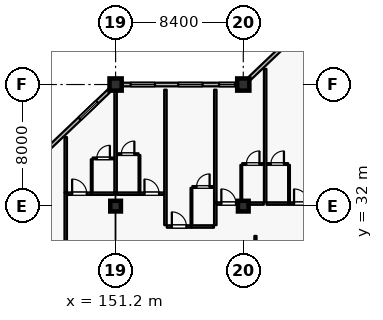
"""IFC4 building model, lengths in metres.
Left out: names, types, materials, properties, quantities, classifications, styles, units other than length and angle.
Written with IfcOpenShell. Run it as: python <this file> out.ifc"""

import sys

from ifc_helpers import new_model, si_unit, direction, frame, frame_2d, origin, origin_2d, place, context, subcontext, project, spatial, rectangle, extrude, element, fill, save


model = new_model("IFC4")
c1 = context("Model", 3, precision=1e-05, world=origin(), true_north=direction((0.0, 1.0)))
c2 = subcontext(c1, "Body", "Model", "MODEL_VIEW")
j1 = project(units=[si_unit("LENGTHUNIT", "METRE"), si_unit("PLANEANGLEUNIT", "RADIAN")], contexts=[c1])
p1 = place(None, origin())
s1 = spatial("IfcSite", under=j1, at=p1, CompositionType="ELEMENT")
p2 = place(p1, origin())
s2 = spatial("IfcBuilding", under=s1, at=p2, CompositionType="ELEMENT")
p3 = place(p2, frame((0.0, 0.0, 16.2)))
s3 = spatial("IfcBuildingStorey", under=s2, at=p3, CompositionType="ELEMENT", Elevation=16.2)
for number, where, z_axis, x_axis in (
    (1, (151.2, 40.0, 0.0), (0.0, 0.0, 1.0), (1.0, 0.0, 0.0)),
    (2, (159.6, 40.0, 0.0), (0.0, 0.0, 1.0), (1.0, 0.0, 0.0)),
):
    element("IfcColumn", number, at=place(p3, frame(where, z_axis=z_axis, x_axis=x_axis)), inside=s3, PredefinedType="COLUMN", context=c2, shape_type="SweptSolid", body=[
        extrude(rectangle(XDim=0.8, YDim=0.8, at=origin_2d()), origin(), (0.0, 0.0, 1.0), 4.8),
    ])
for number, where, z_axis, x_axis in (
    (3, (151.2, 32.0, 0.0), (0.0, 0.0, 1.0), (1.0, 0.0, 0.0)),
    (4, (159.6, 32.0, 0.0), (0.0, 0.0, 1.0), (1.0, 0.0, 0.0)),
):
    element("IfcColumn", number, at=place(p3, frame(where, z_axis=z_axis, x_axis=x_axis)), inside=s3, PredefinedType="COLUMN", context=c2, shape_type="SweptSolid", body=[
        extrude(rectangle(XDim=0.7, YDim=0.7, at=origin_2d()), origin(), (0.0, 0.0, 1.0), 4.8),
    ])
p4 = place(p3, frame((143.2, 32.381, 0.0), z_axis=(0.0, 0.0, 1.0), x_axis=(0.724156739794, 0.689635422677, 0.0)))
e5 = element("IfcWall", 5, at=p4, inside=s3, PredefinedType="SOLIDWALL", context=c2, shape_type="SweptSolid", body=[
    extrude(rectangle(XDim=10.495, YDim=0.24, at=frame_2d((5.248, 0.0))), origin(), (0.0, 0.0, 1.0), 4.13),
])
p5 = place(p4, frame((0.125, 0.0, 0.8)))
e6 = element("IfcOpeningElement", 6, at=p5, cuts=e5, PredefinedType="OPENING", context=c2, shape_type="SweptSolid", body=[
    extrude(rectangle(XDim=1.6, YDim=1.6, at=frame_2d((0.8, 0.8))), frame((0.0, 0.13, 0.0), z_axis=(0.0, -1.0, 0.0), x_axis=(1.0, 0.0, 0.0)), (0.0, 0.0, 1.0), 0.26),
])
p6 = place(p4, frame((3.453, 0.0, 0.8)))
e7 = element("IfcOpeningElement", 7, at=p6, cuts=e5, PredefinedType="OPENING", context=c2, shape_type="SweptSolid", body=[
    extrude(rectangle(XDim=1.6, YDim=1.6, at=frame_2d((0.8, 0.8))), frame((0.0, 0.13, 0.0), z_axis=(0.0, -1.0, 0.0), x_axis=(1.0, 0.0, 0.0)), (0.0, 0.0, 1.0), 0.26),
])
p7 = place(p4, frame((7.776, 0.0, 0.8)))
e8 = element("IfcOpeningElement", 8, at=p7, cuts=e5, PredefinedType="OPENING", context=c2, shape_type="SweptSolid", body=[
    extrude(rectangle(XDim=1.6, YDim=1.6, at=frame_2d((0.8, 0.8))), frame((0.0, 0.13, 0.0), z_axis=(0.0, -1.0, 0.0), x_axis=(1.0, 0.0, 0.0)), (0.0, 0.0, 1.0), 0.26),
])
p8 = place(p3, frame((151.6, 40.0, 0.0), z_axis=(0.0, 0.0, 1.0), x_axis=(1.0, 0.0, 0.0)))
e9 = element("IfcWall", 9, at=p8, inside=s3, PredefinedType="SOLIDWALL", context=c2, shape_type="SweptSolid", body=[
    extrude(rectangle(XDim=7.6, YDim=0.24, at=frame_2d((3.8, 0.0))), origin(), (0.0, 0.0, 1.0), 4.13),
])
p9 = place(p8, frame((0.59, 0.0, 0.8)))
e10 = element("IfcOpeningElement", 10, at=p9, cuts=e9, PredefinedType="OPENING", context=c2, shape_type="SweptSolid", body=[
    extrude(rectangle(XDim=1.6, YDim=1.6, at=frame_2d((0.8, 0.8))), frame((0.0, 0.13, 0.0), z_axis=(0.0, -1.0, 0.0), x_axis=(1.0, 0.0, 0.0)), (0.0, 0.0, 1.0), 0.26),
])
p10 = place(p8, frame((3.72, 0.0, 0.8)))
e11 = element("IfcOpeningElement", 11, at=p10, cuts=e9, PredefinedType="OPENING", context=c2, shape_type="SweptSolid", body=[
    extrude(rectangle(XDim=1.6, YDim=1.6, at=frame_2d((0.8, 0.8))), frame((0.0, 0.13, 0.0), z_axis=(0.0, -1.0, 0.0), x_axis=(1.0, 0.0, 0.0)), (0.0, 0.0, 1.0), 0.26),
])
p11 = place(p8, frame((6.405, 0.0, 0.8)))
e12 = element("IfcOpeningElement", 12, at=p11, cuts=e9, PredefinedType="OPENING", context=c2, shape_type="SweptSolid", body=[
    extrude(rectangle(XDim=1.05, YDim=1.65, at=frame_2d((0.525, 0.825))), frame((0.0, 0.13, 0.0), z_axis=(0.0, -1.0, 0.0), x_axis=(1.0, 0.0, 0.0)), (0.0, 0.0, 1.0), 0.26),
])
p12 = place(p3, frame((160.0, 40.381, 0.0), z_axis=(0.0, 0.0, 1.0), x_axis=(0.724156739794, 0.689635422677, 0.0)))
e13 = element("IfcWall", 13, at=p12, inside=s3, PredefinedType="SOLIDWALL", context=c2, shape_type="SweptSolid", body=[
    extrude(rectangle(XDim=10.495, YDim=0.24, at=frame_2d((5.248, 0.0))), origin(), (0.0, 0.0, 1.0), 4.13),
])
p13 = place(p12, frame((2.901, 0.0, 0.8)))
e14 = element("IfcOpeningElement", 14, at=p13, cuts=e13, PredefinedType="OPENING", context=c2, shape_type="SweptSolid", body=[
    extrude(rectangle(XDim=1.6, YDim=1.6, at=frame_2d((0.8, 0.8))), frame((0.0, 0.13, 0.0), z_axis=(0.0, -1.0, 0.0), x_axis=(1.0, 0.0, 0.0)), (0.0, 0.0, 1.0), 0.26),
])
p14 = place(p12, frame((7.43, 0.0, 0.8)))
e15 = element("IfcOpeningElement", 15, at=p14, cuts=e13, PredefinedType="OPENING", context=c2, shape_type="SweptSolid", body=[
    extrude(rectangle(XDim=1.6, YDim=1.6, at=frame_2d((0.8, 0.8))), frame((0.0, 0.13, 0.0), z_axis=(0.0, -1.0, 0.0), x_axis=(1.0, 0.0, 0.0)), (0.0, 0.0, 1.0), 0.26),
])
p15 = place(p3, frame((147.92, 28.46, 0.0), z_axis=(0.0, 0.0, 1.0), x_axis=(0.0, 1.0, 0.0)))
e16 = element("IfcWall", 16, at=p15, inside=s3, PredefinedType="PARTITIONING", context=c2, shape_type="SweptSolid", body=[
    extrude(rectangle(XDim=4.44, YDim=0.16, at=frame_2d((2.22, 0.0))), origin(), (0.0, 0.0, 1.0), 4.535),
])
p16 = place(p3, frame((148.01, 32.82, 0.0), z_axis=(0.0, 0.0, 1.0), x_axis=(1.0, 0.0, 0.0)))
e17 = element("IfcWall", 17, at=p16, inside=s3, PredefinedType="PARTITIONING", context=c2, shape_type="SweptSolid", body=[
    extrude(rectangle(XDim=1.62, YDim=0.16, at=frame_2d((0.81, 0.0))), origin(), (0.0, 0.0, 1.0), 4.535),
])
p17 = place(p16, frame((0.33, 0.0, 0.0)))
e18 = element("IfcOpeningElement", 18, at=p17, cuts=e17, PredefinedType="OPENING", context=c2, shape_type="SweptSolid", body=[
    extrude(rectangle(XDim=0.96, YDim=2.2, at=frame_2d((0.48, 1.1))), frame((0.0, 0.09, 0.0), z_axis=(0.0, -1.0, 0.0), x_axis=(1.0, 0.0, 0.0)), (0.0, 0.0, 1.0), 0.18),
])
p18 = place(p3, frame((149.64, 32.82, 0.0), z_axis=(0.0, 0.0, 1.0), x_axis=(1.0, 0.0, 0.0)))
e19 = element("IfcWall", 19, at=p18, inside=s3, PredefinedType="PARTITIONING", context=c2, shape_type="SweptSolid", body=[
    extrude(rectangle(XDim=1.47, YDim=0.16, at=frame_2d((0.735, 0.0))), origin(), (0.0, 0.0, 1.0), 4.535),
])
p19 = place(p3, frame((149.63, 32.91, 0.0), z_axis=(0.0, 0.0, 1.0), x_axis=(0.0, 1.0, 0.0)))
e20 = element("IfcWall", 20, at=p19, inside=s3, PredefinedType="PARTITIONING", context=c2, shape_type="SweptSolid", body=[
    extrude(rectangle(XDim=2.17, YDim=0.115, at=frame_2d((1.085, 0.0))), origin(), (0.0, 0.0, 1.0), 4.535),
])
p20 = place(p3, frame((149.69, 35.14, 0.0), z_axis=(0.0, 0.0, 1.0), x_axis=(1.0, 0.0, 0.0)))
e21 = element("IfcWall", 21, at=p20, inside=s3, PredefinedType="PARTITIONING", context=c2, shape_type="SweptSolid", body=[
    extrude(rectangle(XDim=1.41, YDim=0.115, at=frame_2d((0.705, 0.0))), origin(), (0.0, 0.0, 1.0), 4.535),
])
p21 = place(p20, frame((0.275, 0.0, 0.0)))
e22 = element("IfcOpeningElement", 22, at=p21, cuts=e21, PredefinedType="OPENING", context=c2, shape_type="SweptSolid", body=[
    extrude(rectangle(XDim=0.86, YDim=2.12, at=frame_2d((0.43, 1.06))), frame((0.0, 0.067, 0.0), z_axis=(0.0, -1.0, 0.0), x_axis=(1.0, 0.0, 0.0)), (0.0, 0.0, 1.0), 0.135),
])
p22 = place(p3, frame((147.92, 32.91, 0.0), z_axis=(0.0, 0.0, 1.0), x_axis=(0.0, 1.0, 0.0)))
e23 = element("IfcWall", 23, at=p22, inside=s3, PredefinedType="PARTITIONING", context=c2, shape_type="SweptSolid", body=[
    extrude(rectangle(XDim=3.63, YDim=0.16, at=frame_2d((1.815, 0.0))), origin(), (0.0, 0.0, 1.0), 4.535),
])
p23 = place(p3, frame((151.29, 32.82, 0.0), z_axis=(0.0, 0.0, 1.0), x_axis=(1.0, 0.0, 0.0)))
e24 = element("IfcWall", 24, at=p23, inside=s3, PredefinedType="PARTITIONING", context=c2, shape_type="SweptSolid", body=[
    extrude(rectangle(XDim=1.47, YDim=0.16, at=frame_2d((0.735, 0.0))), origin(), (0.0, 0.0, 1.0), 4.535),
])
p24 = place(p3, frame((152.77, 32.82, 0.0), z_axis=(0.0, 0.0, 1.0), x_axis=(1.0, 0.0, 0.0)))
e25 = element("IfcWall", 25, at=p24, inside=s3, PredefinedType="PARTITIONING", context=c2, shape_type="SweptSolid", body=[
    extrude(rectangle(XDim=1.62, YDim=0.16, at=frame_2d((0.81, 0.0))), origin(), (0.0, 0.0, 1.0), 4.535),
])
p25 = place(p24, frame((0.33, 0.0, 0.0)))
e26 = element("IfcOpeningElement", 26, at=p25, cuts=e25, PredefinedType="OPENING", context=c2, shape_type="SweptSolid", body=[
    extrude(rectangle(XDim=0.96, YDim=2.2, at=frame_2d((0.48, 1.1))), frame((0.0, 0.09, 0.0), z_axis=(0.0, -1.0, 0.0), x_axis=(1.0, 0.0, 0.0)), (0.0, 0.0, 1.0), 0.18),
])
p26 = place(p3, frame((152.77, 32.91, 0.0), z_axis=(0.0, 0.0, 1.0), x_axis=(0.0, 1.0, 0.0)))
e27 = element("IfcWall", 27, at=p26, inside=s3, PredefinedType="PARTITIONING", context=c2, shape_type="SweptSolid", body=[
    extrude(rectangle(XDim=2.45, YDim=0.115, at=frame_2d((1.225, 0.0))), origin(), (0.0, 0.0, 1.0), 4.535),
])
p27 = place(p3, frame((151.3, 35.42, 0.0), z_axis=(0.0, 0.0, 1.0), x_axis=(1.0, 0.0, 0.0)))
e28 = element("IfcWall", 28, at=p27, inside=s3, PredefinedType="PARTITIONING", context=c2, shape_type="SweptSolid", body=[
    extrude(rectangle(XDim=1.41, YDim=0.115, at=frame_2d((0.705, 0.0))), origin(), (0.0, 0.0, 1.0), 4.535),
])
p28 = place(p27, frame((0.275, 0.0, 0.0)))
e29 = element("IfcOpeningElement", 29, at=p28, cuts=e28, PredefinedType="OPENING", context=c2, shape_type="SweptSolid", body=[
    extrude(rectangle(XDim=0.86, YDim=2.12, at=frame_2d((0.43, 1.06))), frame((0.0, 0.067, 0.0), z_axis=(0.0, -1.0, 0.0), x_axis=(1.0, 0.0, 0.0)), (0.0, 0.0, 1.0), 0.135),
])
p29 = place(p3, frame((151.2, 32.91, 0.0), z_axis=(0.0, 0.0, 1.0), x_axis=(0.0, 1.0, 0.0)))
e30 = element("IfcWall", 30, at=p29, inside=s3, PredefinedType="PARTITIONING", context=c2, shape_type="SweptSolid", body=[
    extrude(rectangle(XDim=6.75, YDim=0.16, at=frame_2d((3.375, 0.0))), origin(), (0.0, 0.0, 1.0), 3.98),
])
p30 = place(p3, frame((154.57, 30.66, 0.0), z_axis=(0.0, 0.0, 1.0), x_axis=(1.0, 0.0, 0.0)))
e31 = element("IfcWall", 31, at=p30, inside=s3, PredefinedType="PARTITIONING", context=c2, shape_type="SweptSolid", body=[
    extrude(rectangle(XDim=1.62, YDim=0.16, at=frame_2d((0.81, 0.0))), origin(), (0.0, 0.0, 1.0), 4.535),
])
p31 = place(p30, frame((0.33, 0.0, 0.0)))
e32 = element("IfcOpeningElement", 32, at=p31, cuts=e31, PredefinedType="OPENING", context=c2, shape_type="SweptSolid", body=[
    extrude(rectangle(XDim=0.96, YDim=2.2, at=frame_2d((0.48, 1.1))), frame((0.0, 0.09, 0.0), z_axis=(0.0, -1.0, 0.0), x_axis=(1.0, 0.0, 0.0)), (0.0, 0.0, 1.0), 0.18),
])
p32 = place(p3, frame((156.2, 30.66, 0.0), z_axis=(0.0, 0.0, 1.0), x_axis=(1.0, 0.0, 0.0)))
e33 = element("IfcWall", 33, at=p32, inside=s3, PredefinedType="PARTITIONING", context=c2, shape_type="SweptSolid", body=[
    extrude(rectangle(XDim=1.47, YDim=0.16, at=frame_2d((0.735, 0.0))), origin(), (0.0, 0.0, 1.0), 4.535),
])
p33 = place(p3, frame((156.19, 30.75, 0.0), z_axis=(0.0, 0.0, 1.0), x_axis=(0.0, 1.0, 0.0)))
e34 = element("IfcWall", 34, at=p33, inside=s3, PredefinedType="PARTITIONING", context=c2, shape_type="SweptSolid", body=[
    extrude(rectangle(XDim=2.45, YDim=0.115, at=frame_2d((1.225, 0.0))), origin(), (0.0, 0.0, 1.0), 4.535),
])
p34 = place(p3, frame((156.25, 33.26, 0.0), z_axis=(0.0, 0.0, 1.0), x_axis=(1.0, 0.0, 0.0)))
e35 = element("IfcWall", 35, at=p34, inside=s3, PredefinedType="PARTITIONING", context=c2, shape_type="SweptSolid", body=[
    extrude(rectangle(XDim=1.41, YDim=0.115, at=frame_2d((0.705, 0.0))), origin(), (0.0, 0.0, 1.0), 4.535),
])
p35 = place(p34, frame((0.275, 0.0, 0.0)))
e36 = element("IfcOpeningElement", 36, at=p35, cuts=e35, PredefinedType="OPENING", context=c2, shape_type="SweptSolid", body=[
    extrude(rectangle(XDim=0.86, YDim=2.12, at=frame_2d((0.43, 1.06))), frame((0.0, 0.067, 0.0), z_axis=(0.0, -1.0, 0.0), x_axis=(1.0, 0.0, 0.0)), (0.0, 0.0, 1.0), 0.135),
])
p36 = place(p3, frame((154.48, 30.75, 0.0), z_axis=(0.0, 0.0, 1.0), x_axis=(0.0, 1.0, 0.0)))
e37 = element("IfcWall", 37, at=p36, inside=s3, PredefinedType="PARTITIONING", context=c2, shape_type="SweptSolid", body=[
    extrude(rectangle(XDim=8.91, YDim=0.16, at=frame_2d((4.455, 0.0))), origin(), (0.0, 0.0, 1.0), 4.535),
])
p37 = place(p3, frame((157.76, 30.75, 0.0), z_axis=(0.0, 0.0, 1.0), x_axis=(0.0, 1.0, 0.0)))
e38 = element("IfcWall", 38, at=p37, inside=s3, PredefinedType="PARTITIONING", context=c2, shape_type="SweptSolid", body=[
    extrude(rectangle(XDim=1.5, YDim=0.16, at=frame_2d((0.75, 0.0))), origin(), (0.0, 0.0, 1.0), 4.535),
])
p38 = place(p3, frame((157.85, 32.17, 0.0), z_axis=(0.0, 0.0, 1.0), x_axis=(1.0, 0.0, 0.0)))
e39 = element("IfcWall", 39, at=p38, inside=s3, PredefinedType="PARTITIONING", context=c2, shape_type="SweptSolid", body=[
    extrude(rectangle(XDim=1.62, YDim=0.16, at=frame_2d((0.81, 0.0))), origin(), (0.0, 0.0, 1.0), 4.535),
])
p39 = place(p38, frame((0.308, 0.0, 0.0)))
e40 = element("IfcOpeningElement", 40, at=p39, cuts=e39, PredefinedType="OPENING", context=c2, shape_type="SweptSolid", body=[
    extrude(rectangle(XDim=0.96, YDim=2.2, at=frame_2d((0.48, 1.1))), frame((0.0, 0.09, 0.0), z_axis=(0.0, -1.0, 0.0), x_axis=(1.0, 0.0, 0.0)), (0.0, 0.0, 1.0), 0.18),
])
p40 = place(p3, frame((159.48, 32.17, 0.0), z_axis=(0.0, 0.0, 1.0), x_axis=(1.0, 0.0, 0.0)))
e41 = element("IfcWall", 41, at=p40, inside=s3, PredefinedType="PARTITIONING", context=c2, shape_type="SweptSolid", body=[
    extrude(rectangle(XDim=1.47, YDim=0.16, at=frame_2d((0.735, 0.0))), origin(), (0.0, 0.0, 1.0), 4.535),
])
p41 = place(p3, frame((159.47, 32.26, 0.0), z_axis=(0.0, 0.0, 1.0), x_axis=(0.0, 1.0, 0.0)))
e42 = element("IfcWall", 42, at=p41, inside=s3, PredefinedType="PARTITIONING", context=c2, shape_type="SweptSolid", body=[
    extrude(rectangle(XDim=2.45, YDim=0.115, at=frame_2d((1.225, 0.0))), origin(), (0.0, 0.0, 1.0), 4.535),
])
p42 = place(p3, frame((159.53, 34.77, 0.0), z_axis=(0.0, 0.0, 1.0), x_axis=(1.0, 0.0, 0.0)))
e43 = element("IfcWall", 43, at=p42, inside=s3, PredefinedType="PARTITIONING", context=c2, shape_type="SweptSolid", body=[
    extrude(rectangle(XDim=1.41, YDim=0.115, at=frame_2d((0.705, 0.0))), origin(), (0.0, 0.0, 1.0), 4.535),
])
p43 = place(p42, frame((0.275, 0.0, 0.0)))
e44 = element("IfcOpeningElement", 44, at=p43, cuts=e43, PredefinedType="OPENING", context=c2, shape_type="SweptSolid", body=[
    extrude(rectangle(XDim=0.86, YDim=2.12, at=frame_2d((0.43, 1.06))), frame((0.0, 0.067, 0.0), z_axis=(0.0, -1.0, 0.0), x_axis=(1.0, 0.0, 0.0)), (0.0, 0.0, 1.0), 0.135),
])
p44 = place(p3, frame((157.76, 32.26, 0.0), z_axis=(0.0, 0.0, 1.0), x_axis=(0.0, 1.0, 0.0)))
e45 = element("IfcWall", 45, at=p44, inside=s3, PredefinedType="PARTITIONING", context=c2, shape_type="SweptSolid", body=[
    extrude(rectangle(XDim=7.4, YDim=0.16, at=frame_2d((3.7, 0.0))), origin(), (0.0, 0.0, 1.0), 4.535),
])
p45 = place(p3, frame((161.13, 32.17, 0.0), z_axis=(0.0, 0.0, 1.0), x_axis=(1.0, 0.0, 0.0)))
e46 = element("IfcWall", 46, at=p45, inside=s3, PredefinedType="PARTITIONING", context=c2, shape_type="SweptSolid", body=[
    extrude(rectangle(XDim=1.47, YDim=0.16, at=frame_2d((0.735, 0.0))), origin(), (0.0, 0.0, 1.0), 4.535),
])
p46 = place(p3, frame((162.61, 32.17, 0.0), z_axis=(0.0, 0.0, 1.0), x_axis=(1.0, 0.0, 0.0)))
e47 = element("IfcWall", 47, at=p46, inside=s3, PredefinedType="PARTITIONING", context=c2, shape_type="SweptSolid", body=[
    extrude(rectangle(XDim=1.62, YDim=0.16, at=frame_2d((0.81, 0.0))), origin(), (0.0, 0.0, 1.0), 4.535),
])
p47 = place(p46, frame((0.33, 0.0, 0.0)))
e48 = element("IfcOpeningElement", 48, at=p47, cuts=e47, PredefinedType="OPENING", context=c2, shape_type="SweptSolid", body=[
    extrude(rectangle(XDim=0.96, YDim=2.2, at=frame_2d((0.48, 1.1))), frame((0.0, 0.09, 0.0), z_axis=(0.0, -1.0, 0.0), x_axis=(1.0, 0.0, 0.0)), (0.0, 0.0, 1.0), 0.18),
])
p48 = place(p3, frame((162.61, 32.26, 0.0), z_axis=(0.0, 0.0, 1.0), x_axis=(0.0, 1.0, 0.0)))
e49 = element("IfcWall", 49, at=p48, inside=s3, PredefinedType="PARTITIONING", context=c2, shape_type="SweptSolid", body=[
    extrude(rectangle(XDim=2.45, YDim=0.115, at=frame_2d((1.225, 0.0))), origin(), (0.0, 0.0, 1.0), 4.535),
])
p49 = place(p3, frame((161.14, 34.77, 0.0), z_axis=(0.0, 0.0, 1.0), x_axis=(1.0, 0.0, 0.0)))
e50 = element("IfcWall", 50, at=p49, inside=s3, PredefinedType="PARTITIONING", context=c2, shape_type="SweptSolid", body=[
    extrude(rectangle(XDim=1.41, YDim=0.115, at=frame_2d((0.705, 0.0))), origin(), (0.0, 0.0, 1.0), 4.535),
])
p50 = place(p49, frame((0.275, 0.0, 0.0)))
e51 = element("IfcOpeningElement", 51, at=p50, cuts=e50, PredefinedType="OPENING", context=c2, shape_type="SweptSolid", body=[
    extrude(rectangle(XDim=0.86, YDim=2.12, at=frame_2d((0.43, 1.06))), frame((0.0, 0.067, 0.0), z_axis=(0.0, -1.0, 0.0), x_axis=(1.0, 0.0, 0.0)), (0.0, 0.0, 1.0), 0.135),
])
p51 = place(p3, frame((161.04, 32.26, 0.0), z_axis=(0.0, 0.0, 1.0), x_axis=(0.0, 1.0, 0.0)))
e52 = element("IfcWall", 52, at=p51, inside=s3, PredefinedType="PARTITIONING", context=c2, shape_type="SweptSolid", body=[
    extrude(rectangle(XDim=8.77, YDim=0.16, at=frame_2d((4.385, 0.0))), origin(), (0.0, 0.0, 1.0), 4.535),
])
p52 = place(p3, frame((160.4, 24.96, 0.0), z_axis=(0.0, 0.0, 1.0), x_axis=(0.0, 1.0, 0.0)))
e53 = element("IfcWall", 53, at=p52, inside=s3, PredefinedType="PARTITIONING", context=c2, shape_type="SweptSolid", body=[
    extrude(rectangle(XDim=5.08, YDim=0.14, at=frame_2d((2.54, 0.0))), origin(), (0.0, 0.0, 1.0), 4.535),
])
p53 = place(p52, frame((1.59, 0.0, 0.0)))
e54 = element("IfcOpeningElement", 54, at=p53, cuts=e53, PredefinedType="OPENING", context=c2, shape_type="SweptSolid", body=[
    extrude(rectangle(XDim=1.9, YDim=2.4, at=frame_2d((0.95, 1.2))), frame((0.0, 0.08, 0.0), z_axis=(0.0, -1.0, 0.0), x_axis=(1.0, 0.0, 0.0)), (0.0, 0.0, 1.0), 0.16),
])
p54 = place(p7, origin())
e55 = element("IfcWindow", 55, at=p54, inside=s3, PartitioningType="SINGLE_PANEL", PredefinedType="WINDOW", context=c2, shape_type="SweptSolid", body=[
    extrude(rectangle(XDim=1.6, YDim=1.6, at=frame_2d((0.8, 0.8))), frame((0.0, 0.03, 0.0), z_axis=(0.0, -1.0, 0.0), x_axis=(1.0, 0.0, 0.0)), (0.0, 0.0, 1.0), 0.06),
])
fill(e8, e55)
p55 = place(p9, origin())
e56 = element("IfcWindow", 56, at=p55, inside=s3, PartitioningType="SINGLE_PANEL", PredefinedType="WINDOW", context=c2, shape_type="SweptSolid", body=[
    extrude(rectangle(XDim=1.6, YDim=1.6, at=frame_2d((0.8, 0.8))), frame((0.0, 0.03, 0.0), z_axis=(0.0, -1.0, 0.0), x_axis=(1.0, 0.0, 0.0)), (0.0, 0.0, 1.0), 0.06),
])
fill(e10, e56)
p56 = place(p10, origin())
e57 = element("IfcWindow", 57, at=p56, inside=s3, PartitioningType="SINGLE_PANEL", PredefinedType="WINDOW", context=c2, shape_type="SweptSolid", body=[
    extrude(rectangle(XDim=1.6, YDim=1.6, at=frame_2d((0.8, 0.8))), frame((0.0, 0.03, 0.0), z_axis=(0.0, -1.0, 0.0), x_axis=(1.0, 0.0, 0.0)), (0.0, 0.0, 1.0), 0.06),
])
fill(e11, e57)
p57 = place(p11, origin())
e58 = element("IfcWindow", 58, at=p57, inside=s3, PartitioningType="SINGLE_PANEL", PredefinedType="WINDOW", context=c2, shape_type="SweptSolid", body=[
    extrude(rectangle(XDim=1.05, YDim=1.65, at=frame_2d((0.525, 0.825))), frame((0.0, 0.03, 0.0), z_axis=(0.0, -1.0, 0.0), x_axis=(1.0, 0.0, 0.0)), (0.0, 0.0, 1.0), 0.06),
])
fill(e12, e58)
p58 = place(p17, origin())
e59 = element("IfcDoor", 59, at=p58, inside=s3, OperationType="SINGLE_SWING_LEFT", PredefinedType="DOOR", context=c2, shape_type="SweptSolid", body=[
    extrude(rectangle(XDim=0.96, YDim=2.2, at=frame_2d((0.48, 1.1))), frame((0.0, 0.025, 0.0), z_axis=(0.0, -1.0, 0.0), x_axis=(1.0, 0.0, 0.0)), (0.0, 0.0, 1.0), 0.05),
])
fill(e18, e59)
p59 = place(p21, origin())
e60 = element("IfcDoor", 60, at=p59, inside=s3, OperationType="SINGLE_SWING_RIGHT", PredefinedType="DOOR", context=c2, shape_type="SweptSolid", body=[
    extrude(rectangle(XDim=0.86, YDim=2.12, at=frame_2d((0.43, 1.06))), frame((0.0, 0.025, 0.0), z_axis=(0.0, -1.0, 0.0), x_axis=(1.0, 0.0, 0.0)), (0.0, 0.0, 1.0), 0.05),
])
fill(e22, e60)
p60 = place(p25, origin())
e61 = element("IfcDoor", 61, at=p60, inside=s3, OperationType="SINGLE_SWING_LEFT", PredefinedType="DOOR", context=c2, shape_type="SweptSolid", body=[
    extrude(rectangle(XDim=0.96, YDim=2.2, at=frame_2d((0.48, 1.1))), frame((0.0, 0.025, 0.0), z_axis=(0.0, -1.0, 0.0), x_axis=(1.0, 0.0, 0.0)), (0.0, 0.0, 1.0), 0.05),
])
fill(e26, e61)
p61 = place(p28, origin())
e62 = element("IfcDoor", 62, at=p61, inside=s3, OperationType="SINGLE_SWING_RIGHT", PredefinedType="DOOR", context=c2, shape_type="SweptSolid", body=[
    extrude(rectangle(XDim=0.86, YDim=2.12, at=frame_2d((0.43, 1.06))), frame((0.0, 0.025, 0.0), z_axis=(0.0, -1.0, 0.0), x_axis=(1.0, 0.0, 0.0)), (0.0, 0.0, 1.0), 0.05),
])
fill(e29, e62)
p62 = place(p31, origin())
e63 = element("IfcDoor", 63, at=p62, inside=s3, OperationType="SINGLE_SWING_LEFT", PredefinedType="DOOR", context=c2, shape_type="SweptSolid", body=[
    extrude(rectangle(XDim=0.96, YDim=2.2, at=frame_2d((0.48, 1.1))), frame((0.0, 0.025, 0.0), z_axis=(0.0, -1.0, 0.0), x_axis=(1.0, 0.0, 0.0)), (0.0, 0.0, 1.0), 0.05),
])
fill(e32, e63)
p63 = place(p35, origin())
e64 = element("IfcDoor", 64, at=p63, inside=s3, OperationType="SINGLE_SWING_RIGHT", PredefinedType="DOOR", context=c2, shape_type="SweptSolid", body=[
    extrude(rectangle(XDim=0.86, YDim=2.12, at=frame_2d((0.43, 1.06))), frame((0.0, 0.025, 0.0), z_axis=(0.0, -1.0, 0.0), x_axis=(1.0, 0.0, 0.0)), (0.0, 0.0, 1.0), 0.05),
])
fill(e36, e64)
p64 = place(p39, origin())
e65 = element("IfcDoor", 65, at=p64, inside=s3, OperationType="SINGLE_SWING_LEFT", PredefinedType="DOOR", context=c2, shape_type="SweptSolid", body=[
    extrude(rectangle(XDim=0.96, YDim=2.2, at=frame_2d((0.48, 1.1))), frame((0.0, 0.025, 0.0), z_axis=(0.0, -1.0, 0.0), x_axis=(1.0, 0.0, 0.0)), (0.0, 0.0, 1.0), 0.05),
])
fill(e40, e65)
p65 = place(p43, origin())
e66 = element("IfcDoor", 66, at=p65, inside=s3, OperationType="SINGLE_SWING_RIGHT", PredefinedType="DOOR", context=c2, shape_type="SweptSolid", body=[
    extrude(rectangle(XDim=0.86, YDim=2.12, at=frame_2d((0.43, 1.06))), frame((0.0, 0.025, 0.0), z_axis=(0.0, -1.0, 0.0), x_axis=(1.0, 0.0, 0.0)), (0.0, 0.0, 1.0), 0.05),
])
fill(e44, e66)
p66 = place(p47, origin())
e67 = element("IfcDoor", 67, at=p66, inside=s3, OperationType="SINGLE_SWING_LEFT", PredefinedType="DOOR", context=c2, shape_type="SweptSolid", body=[
    extrude(rectangle(XDim=0.96, YDim=2.2, at=frame_2d((0.48, 1.1))), frame((0.0, 0.025, 0.0), z_axis=(0.0, -1.0, 0.0), x_axis=(1.0, 0.0, 0.0)), (0.0, 0.0, 1.0), 0.05),
])
fill(e48, e67)
p67 = place(p50, origin())
e68 = element("IfcDoor", 68, at=p67, inside=s3, OperationType="SINGLE_SWING_RIGHT", PredefinedType="DOOR", context=c2, shape_type="SweptSolid", body=[
    extrude(rectangle(XDim=0.86, YDim=2.12, at=frame_2d((0.43, 1.06))), frame((0.0, 0.025, 0.0), z_axis=(0.0, -1.0, 0.0), x_axis=(1.0, 0.0, 0.0)), (0.0, 0.0, 1.0), 0.05),
])
fill(e51, e68)
save(model, sys.argv[1])
